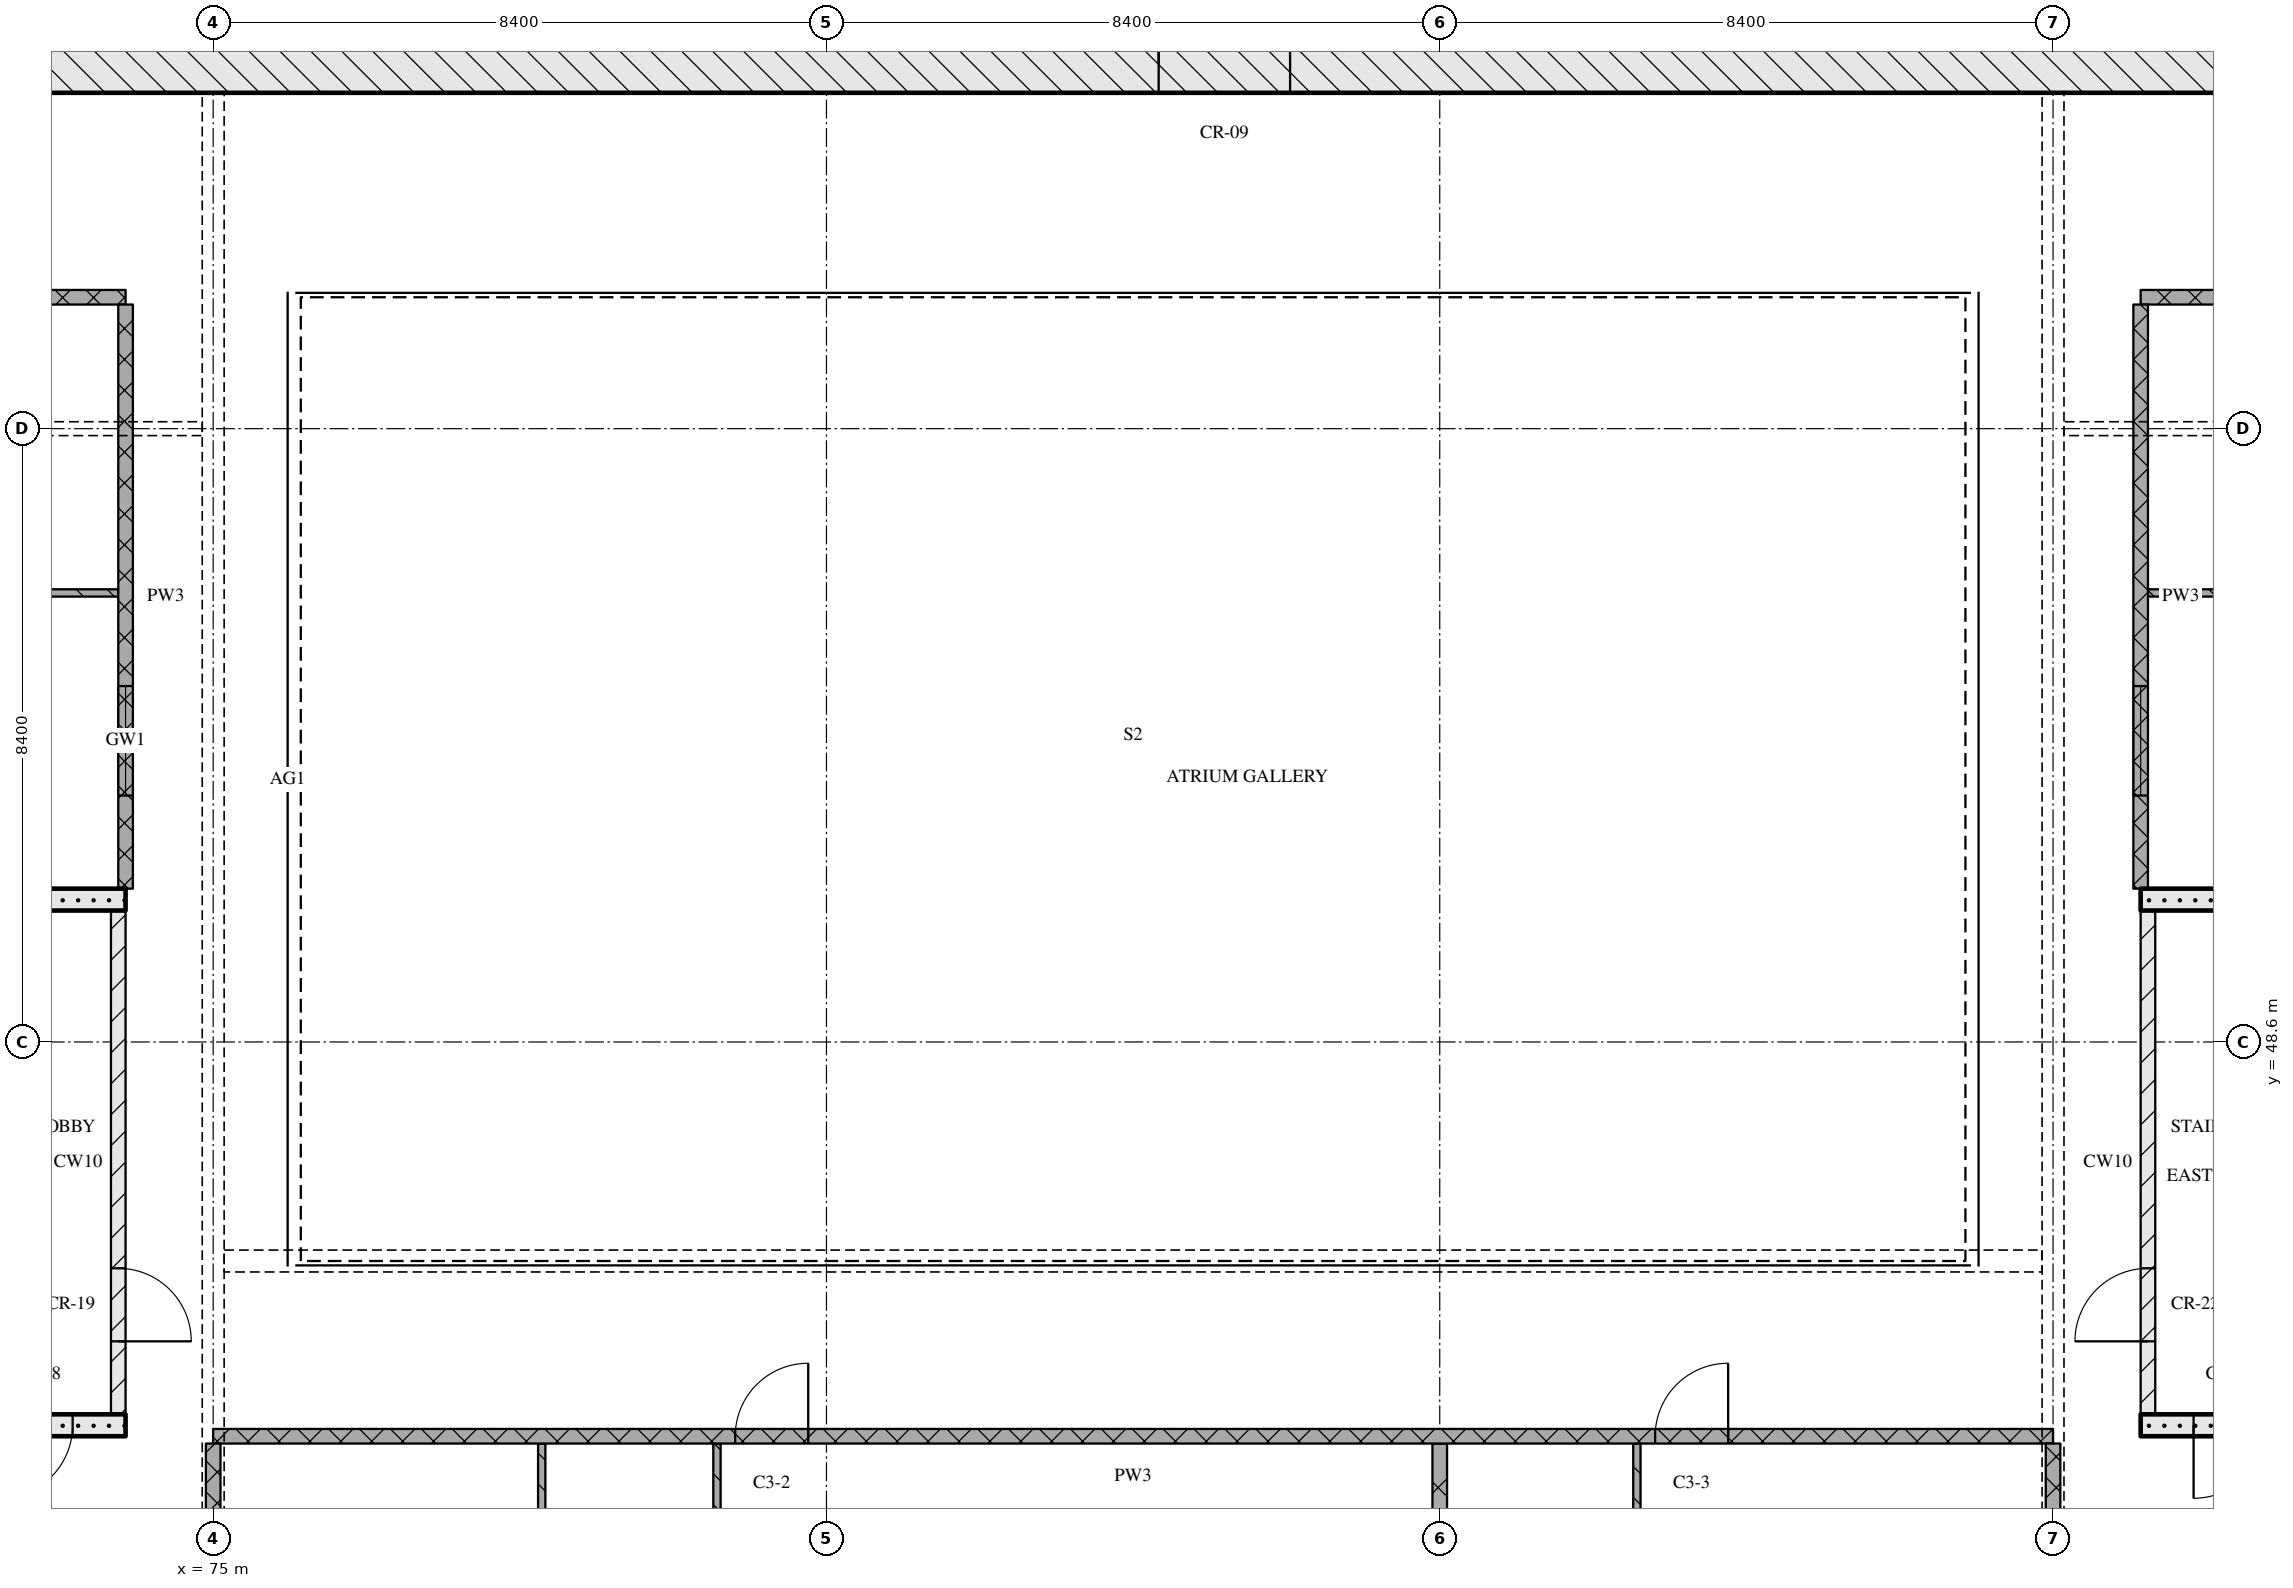
"""IFC4 building model, lengths in metres.
Left out: names, types, materials, properties, quantities, classifications, styles, units other than length and angle.
Written with IfcOpenShell. Run it as: python <this file> out.ifc"""

import sys

from ifc_helpers import new_model, si_unit, direction, frame, frame_2d, origin, place, context, subcontext, project, spatial, rectangle, extrude, element, fill, save


model = new_model("IFC4")
c1 = context("Model", 3, precision=1e-05, world=origin(), true_north=direction((0.0, 1.0)))
c2 = subcontext(c1, "Body", "Model", "MODEL_VIEW")
j1 = project(units=[si_unit("LENGTHUNIT", "METRE"), si_unit("PLANEANGLEUNIT", "RADIAN")], contexts=[c1])
p1 = place(None, origin())
s1 = spatial("IfcSite", under=j1, at=p1, CompositionType="ELEMENT")
p2 = place(p1, origin())
s2 = spatial("IfcBuilding", under=s1, at=p2, CompositionType="ELEMENT")
p3 = place(p2, frame((0.0, 0.0, 172.65)))
s3 = spatial("IfcBuildingStorey", under=s2, at=p3, CompositionType="ELEMENT", Elevation=172.65)
p4 = place(p3, frame((67.0, 62.0, 0.0), z_axis=(0.0, 0.0, 1.0), x_axis=(1.0, 0.0, 0.0)))
e1 = element("IfcWall", 1, at=p4, inside=s3, PredefinedType="SOLIDWALL", context=c2, shape_type="SweptSolid", body=[
    extrude(rectangle(XDim=41.2, YDim=0.8, at=frame_2d((20.6, 0.0))), origin(), (0.0, 0.0, 1.0), 3.32),
])
p5 = place(p4, frame((20.95, 0.0, 0.0)))
e2 = element("IfcOpeningElement", 2, at=p5, cuts=e1, PredefinedType="OPENING", context=c2, shape_type="SweptSolid", body=[
    extrude(rectangle(XDim=1.8, YDim=2.1, at=frame_2d((0.9, 1.05))), frame((0.0, 0.41, 0.0), z_axis=(0.0, -1.0, 0.0), x_axis=(1.0, 0.0, 0.0)), (0.0, 0.0, 1.0), 0.82),
])
p6 = place(p3, frame((68.2, 43.35, 0.0), z_axis=(0.0, 0.0, 1.0), x_axis=(1.0, 0.0, 0.0)))
e3 = element("IfcWall", 3, at=p6, inside=s3, PredefinedType="SOLIDWALL", context=c2, shape_type="SweptSolid", body=[
    extrude(rectangle(XDim=5.6, YDim=0.3, at=frame_2d((2.8, 0.0))), origin(), (0.0, 0.0, 1.0), 3.32),
])
p7 = place(p6, frame((3.875, 0.0, 0.0)))
e4 = element("IfcOpeningElement", 4, at=p7, cuts=e3, PredefinedType="OPENING", context=c2, shape_type="SweptSolid", body=[
    extrude(rectangle(XDim=1.0, YDim=2.1, at=frame_2d((0.5, 1.05))), frame((0.0, 0.16, 0.0), z_axis=(0.0, -1.0, 0.0), x_axis=(1.0, 0.0, 0.0)), (0.0, 0.0, 1.0), 0.32),
])
p8 = place(p3, frame((73.7, 43.5, 0.0), z_axis=(0.0, 0.0, 1.0), x_axis=(0.0, 1.0, 0.0)))
e5 = element("IfcWall", 5, at=p8, inside=s3, PredefinedType="PARTITIONING", context=c2, shape_type="SweptSolid", body=[
    extrude(rectangle(XDim=6.9, YDim=0.2, at=frame_2d((3.45, 0.0))), origin(), (0.0, 0.0, 1.0), 3.32),
])
p9 = place(p8, frame((1.0, 0.0, 0.0)))
e6 = element("IfcOpeningElement", 6, at=p9, cuts=e5, PredefinedType="OPENING", context=c2, shape_type="SweptSolid", body=[
    extrude(rectangle(XDim=1.0, YDim=2.1, at=frame_2d((0.5, 1.05))), frame((0.0, 0.11, 0.0), z_axis=(0.0, -1.0, 0.0), x_axis=(1.0, 0.0, 0.0)), (0.0, 0.0, 1.0), 0.22),
])
p10 = place(p3, frame((68.2, 50.55, 0.0), z_axis=(0.0, 0.0, 1.0), x_axis=(1.0, 0.0, 0.0)))
e7 = element("IfcWall", 7, at=p10, inside=s3, PredefinedType="SOLIDWALL", context=c2, shape_type="SweptSolid", body=[
    extrude(rectangle(XDim=5.6, YDim=0.3, at=frame_2d((2.8, 0.0))), origin(), (0.0, 0.0, 1.0), 3.32),
])
p11 = place(p3, frame((101.4, 43.35, 0.0), z_axis=(0.0, 0.0, 1.0), x_axis=(1.0, 0.0, 0.0)))
e8 = element("IfcWall", 8, at=p11, inside=s3, PredefinedType="SOLIDWALL", context=c2, shape_type="SweptSolid", body=[
    extrude(rectangle(XDim=5.6, YDim=0.3, at=frame_2d((2.8, 0.0))), origin(), (0.0, 0.0, 1.0), 3.32),
])
p12 = place(p11, frame((0.725, 0.0, 0.0)))
e9 = element("IfcOpeningElement", 9, at=p12, cuts=e8, PredefinedType="OPENING", context=c2, shape_type="SweptSolid", body=[
    extrude(rectangle(XDim=1.0, YDim=2.1, at=frame_2d((0.5, 1.05))), frame((0.0, 0.16, 0.0), z_axis=(0.0, -1.0, 0.0), x_axis=(1.0, 0.0, 0.0)), (0.0, 0.0, 1.0), 0.32),
])
p13 = place(p3, frame((101.5, 43.5, 0.0), z_axis=(0.0, 0.0, 1.0), x_axis=(0.0, 1.0, 0.0)))
e10 = element("IfcWall", 10, at=p13, inside=s3, PredefinedType="PARTITIONING", context=c2, shape_type="SweptSolid", body=[
    extrude(rectangle(XDim=6.9, YDim=0.2, at=frame_2d((3.45, 0.0))), origin(), (0.0, 0.0, 1.0), 3.32),
])
p14 = place(p13, frame((1.0, 0.0, 0.0)))
e11 = element("IfcOpeningElement", 11, at=p14, cuts=e10, PredefinedType="OPENING", context=c2, shape_type="SweptSolid", body=[
    extrude(rectangle(XDim=1.0, YDim=2.1, at=frame_2d((0.5, 1.05))), frame((0.0, 0.11, 0.0), z_axis=(0.0, -1.0, 0.0), x_axis=(1.0, 0.0, 0.0)), (0.0, 0.0, 1.0), 0.22),
])
p15 = place(p3, frame((101.4, 50.55, 0.0), z_axis=(0.0, 0.0, 1.0), x_axis=(1.0, 0.0, 0.0)))
e12 = element("IfcWall", 12, at=p15, inside=s3, PredefinedType="SOLIDWALL", context=c2, shape_type="SweptSolid", body=[
    extrude(rectangle(XDim=5.6, YDim=0.3, at=frame_2d((2.8, 0.0))), origin(), (0.0, 0.0, 1.0), 3.32),
])
p16 = place(p3, frame((100.2, 43.2, 0.0), z_axis=(0.0, 0.0, 1.0), x_axis=(-1.0, 0.0, 0.0)))
e13 = element("IfcWall", 13, at=p16, inside=s3, PredefinedType="PARTITIONING", context=c2, shape_type="SweptSolid", body=[
    extrude(rectangle(XDim=25.2, YDim=0.2, at=frame_2d((12.6, 0.0))), origin(), (0.0, 0.0, 1.0), 3.32),
])
p17 = place(p16, frame((4.45, 0.0, 0.0)))
e14 = element("IfcOpeningElement", 14, at=p17, cuts=e13, PredefinedType="OPENING", context=c2, shape_type="SweptSolid", body=[
    extrude(rectangle(XDim=1.0, YDim=2.1, at=frame_2d((0.5, 1.05))), frame((0.0, 0.11, 0.0), z_axis=(0.0, -1.0, 0.0), x_axis=(1.0, 0.0, 0.0)), (0.0, 0.0, 1.0), 0.22),
])
p18 = place(p16, frame((17.05, 0.0, 0.0)))
e15 = element("IfcOpeningElement", 15, at=p18, cuts=e13, PredefinedType="OPENING", context=c2, shape_type="SweptSolid", body=[
    extrude(rectangle(XDim=1.0, YDim=2.1, at=frame_2d((0.5, 1.05))), frame((0.0, 0.11, 0.0), z_axis=(0.0, -1.0, 0.0), x_axis=(1.0, 0.0, 0.0)), (0.0, 0.0, 1.0), 0.22),
])
p19 = place(p3, frame((73.7, 54.75, 0.0), z_axis=(0.0, 0.0, 1.0), x_axis=(-1.0, 0.0, 0.0)))
e16 = element("IfcWall", 16, at=p19, inside=s3, PredefinedType="PARTITIONING", context=c2, shape_type="SweptSolid", body=[
    extrude(rectangle(XDim=5.3, YDim=0.1, at=frame_2d((2.65, 0.0))), origin(), (0.0, 0.0, 1.0), 3.32),
])
p20 = place(p19, frame((2.15, 0.0, 0.0)))
e17 = element("IfcOpeningElement", 17, at=p20, cuts=e16, PredefinedType="OPENING", context=c2, shape_type="SweptSolid", body=[
    extrude(rectangle(XDim=0.9, YDim=2.1, at=frame_2d((0.45, 1.05))), frame((0.0, 0.06, 0.0), z_axis=(0.0, -1.0, 0.0), x_axis=(1.0, 0.0, 0.0)), (0.0, 0.0, 1.0), 0.12),
])
p21 = place(p3, frame((101.5, 54.75, 0.0), z_axis=(0.0, 0.0, 1.0), x_axis=(1.0, 0.0, 0.0)))
e18 = element("IfcWall", 18, at=p21, inside=s3, PredefinedType="PARTITIONING", context=c2, shape_type="SweptSolid", body=[
    extrude(rectangle(XDim=6.2, YDim=0.1, at=frame_2d((3.1, 0.0))), origin(), (0.0, 0.0, 1.0), 3.32),
])
p22 = place(p3, frame((63.0, 58.8, 0.0), z_axis=(0.0, 0.0, 1.0), x_axis=(1.0, 0.0, 0.0)))
e19 = element("IfcWall", 19, at=p22, inside=s3, PredefinedType="PARTITIONING", context=c2, shape_type="SweptSolid", body=[
    extrude(rectangle(XDim=10.8, YDim=0.2, at=frame_2d((5.4, 0.0))), origin(), (0.0, 0.0, 1.0), 3.32),
])
p23 = place(p3, frame((112.2, 58.8, 0.0), z_axis=(0.0, 0.0, 1.0), x_axis=(-1.0, 0.0, 0.0)))
e20 = element("IfcWall", 20, at=p23, inside=s3, PredefinedType="PARTITIONING", context=c2, shape_type="SweptSolid", body=[
    extrude(rectangle(XDim=10.8, YDim=0.2, at=frame_2d((5.4, 0.0))), origin(), (0.0, 0.0, 1.0), 3.32),
])
p24 = place(p23, frame((2.85, 0.0, 0.0)))
e21 = element("IfcOpeningElement", 21, at=p24, cuts=e20, PredefinedType="OPENING", context=c2, shape_type="SweptSolid", body=[
    extrude(rectangle(XDim=1.0, YDim=2.1, at=frame_2d((0.5, 1.05))), frame((0.0, 0.11, 0.0), z_axis=(0.0, -1.0, 0.0), x_axis=(1.0, 0.0, 0.0)), (0.0, 0.0, 1.0), 0.22),
])
p25 = place(p3, frame((73.8, 58.7, 0.0), z_axis=(0.0, 0.0, 1.0), x_axis=(0.0, -1.0, 0.0)))
e22 = element("IfcWall", 22, at=p25, inside=s3, PredefinedType="PARTITIONING", context=c2, shape_type="SweptSolid", body=[
    extrude(rectangle(XDim=8.0, YDim=0.2, at=frame_2d((4.0, 0.0))), origin(), (0.0, 0.0, 1.0), 3.32),
])
p26 = place(p25, frame((5.225, 0.0, 0.9)))
e23 = element("IfcOpeningElement", 23, at=p26, cuts=e22, PredefinedType="OPENING", context=c2, shape_type="SweptSolid", body=[
    extrude(rectangle(XDim=1.5, YDim=1.5, at=frame_2d((0.75, 0.75))), frame((0.0, 0.11, 0.0), z_axis=(0.0, -1.0, 0.0), x_axis=(1.0, 0.0, 0.0)), (0.0, 0.0, 1.0), 0.22),
])
p27 = place(p3, frame((75.0, 43.1, 0.0), z_axis=(0.0, 0.0, 1.0), x_axis=(0.0, -1.0, 0.0)))
e24 = element("IfcWall", 24, at=p27, inside=s3, PredefinedType="PARTITIONING", context=c2, shape_type="SweptSolid", body=[
    extrude(rectangle(XDim=2.2, YDim=0.2, at=frame_2d((1.1, 0.0))), origin(), (0.0, 0.0, 1.0), 2.43),
])
for number, where, z_axis, x_axis in (
    (25, (79.5, 43.1, 0.0), (0.0, 0.0, 1.0), (0.0, -1.0, 0.0)),
    (26, (81.9, 43.1, 0.0), (0.0, 0.0, 1.0), (0.0, -1.0, 0.0)),
):
    element("IfcWall", number, at=place(p3, frame(where, z_axis=z_axis, x_axis=x_axis)), inside=s3, PredefinedType="PARTITIONING", context=c2, shape_type="SweptSolid", body=[
        extrude(rectangle(XDim=4.35, YDim=0.1, at=frame_2d((2.175, 0.0))), origin(), (0.0, 0.0, 1.0), 3.32),
    ])
p28 = place(p3, frame((91.8, 43.1, 0.0), z_axis=(0.0, 0.0, 1.0), x_axis=(0.0, -1.0, 0.0)))
e27 = element("IfcWall", 27, at=p28, inside=s3, PredefinedType="PARTITIONING", context=c2, shape_type="SweptSolid", body=[
    extrude(rectangle(XDim=2.53, YDim=0.2, at=frame_2d((1.265, 0.0))), origin(), (0.0, 0.0, 1.0), 3.32),
])
p29 = place(p3, frame((94.5, 43.1, 0.0), z_axis=(0.0, 0.0, 1.0), x_axis=(0.0, -1.0, 0.0)))
e28 = element("IfcWall", 28, at=p29, inside=s3, PredefinedType="PARTITIONING", context=c2, shape_type="SweptSolid", body=[
    extrude(rectangle(XDim=3.75, YDim=0.1, at=frame_2d((1.875, 0.0))), origin(), (0.0, 0.0, 1.0), 3.32),
])
p30 = place(p3, frame((100.2, 43.1, 0.0), z_axis=(0.0, 0.0, 1.0), x_axis=(0.0, -1.0, 0.0)))
e29 = element("IfcWall", 29, at=p30, inside=s3, PredefinedType="PARTITIONING", context=c2, shape_type="SweptSolid", body=[
    extrude(rectangle(XDim=2.2, YDim=0.2, at=frame_2d((1.1, 0.0))), origin(), (0.0, 0.0, 1.0), 2.43),
])
p31 = place(p3, frame((101.4, 58.7, 0.0), z_axis=(0.0, 0.0, 1.0), x_axis=(0.0, -1.0, 0.0)))
e30 = element("IfcWall", 30, at=p31, inside=s3, PredefinedType="PARTITIONING", context=c2, shape_type="SweptSolid", body=[
    extrude(rectangle(XDim=8.0, YDim=0.2, at=frame_2d((4.0, 0.0))), origin(), (0.0, 0.0, 1.0), 3.32),
])
p32 = place(p31, frame((5.225, 0.0, 0.9)))
e31 = element("IfcOpeningElement", 31, at=p32, cuts=e30, PredefinedType="OPENING", context=c2, shape_type="SweptSolid", body=[
    extrude(rectangle(XDim=1.5, YDim=1.5, at=frame_2d((0.75, 0.75))), frame((0.0, 0.11, 0.0), z_axis=(0.0, -1.0, 0.0), x_axis=(1.0, 0.0, 0.0)), (0.0, 0.0, 1.0), 0.22),
])
p33 = place(p5, origin())
e32 = element("IfcDoor", 32, at=p33, inside=s3, OperationType="DOUBLE_DOOR_SINGLE_SWING", PredefinedType="DOOR", context=c2, shape_type="SweptSolid", body=[
    extrude(rectangle(XDim=1.8, YDim=2.1, at=frame_2d((0.9, 1.05))), frame((0.0, 0.025, 0.0), z_axis=(0.0, -1.0, 0.0), x_axis=(1.0, 0.0, 0.0)), (0.0, 0.0, 1.0), 0.05),
])
fill(e2, e32)
p34 = place(p7, origin())
e33 = element("IfcDoor", 33, at=p34, inside=s3, OperationType="SINGLE_SWING_RIGHT", PredefinedType="DOOR", context=c2, shape_type="SweptSolid", body=[
    extrude(rectangle(XDim=1.0, YDim=2.1, at=frame_2d((0.5, 1.05))), frame((0.0, 0.025, 0.0), z_axis=(0.0, -1.0, 0.0), x_axis=(1.0, 0.0, 0.0)), (0.0, 0.0, 1.0), 0.05),
])
fill(e4, e33)
p35 = place(p9, origin())
e34 = element("IfcDoor", 34, at=p35, inside=s3, OperationType="SINGLE_SWING_RIGHT", PredefinedType="DOOR", context=c2, shape_type="SweptSolid", body=[
    extrude(rectangle(XDim=1.0, YDim=2.1, at=frame_2d((0.5, 1.05))), frame((0.0, 0.025, 0.0), z_axis=(0.0, -1.0, 0.0), x_axis=(1.0, 0.0, 0.0)), (0.0, 0.0, 1.0), 0.05),
])
fill(e6, e34)
p36 = place(p12, origin())
e35 = element("IfcDoor", 35, at=p36, inside=s3, OperationType="SINGLE_SWING_RIGHT", PredefinedType="DOOR", context=c2, shape_type="SweptSolid", body=[
    extrude(rectangle(XDim=1.0, YDim=2.1, at=frame_2d((0.5, 1.05))), frame((0.0, 0.025, 0.0), z_axis=(0.0, -1.0, 0.0), x_axis=(1.0, 0.0, 0.0)), (0.0, 0.0, 1.0), 0.05),
])
fill(e9, e35)
p37 = place(p14, origin())
e36 = element("IfcDoor", 36, at=p37, inside=s3, OperationType="SINGLE_SWING_LEFT", PredefinedType="DOOR", context=c2, shape_type="SweptSolid", body=[
    extrude(rectangle(XDim=1.0, YDim=2.1, at=frame_2d((0.5, 1.05))), frame((0.0, 0.025, 0.0), z_axis=(0.0, -1.0, 0.0), x_axis=(1.0, 0.0, 0.0)), (0.0, 0.0, 1.0), 0.05),
])
fill(e11, e36)
p38 = place(p17, origin())
e37 = element("IfcDoor", 37, at=p38, inside=s3, OperationType="SINGLE_SWING_RIGHT", PredefinedType="DOOR", context=c2, shape_type="SweptSolid", body=[
    extrude(rectangle(XDim=1.0, YDim=2.1, at=frame_2d((0.5, 1.05))), frame((0.0, 0.025, 0.0), z_axis=(0.0, -1.0, 0.0), x_axis=(1.0, 0.0, 0.0)), (0.0, 0.0, 1.0), 0.05),
])
fill(e14, e37)
p39 = place(p18, origin())
e38 = element("IfcDoor", 38, at=p39, inside=s3, OperationType="SINGLE_SWING_RIGHT", PredefinedType="DOOR", context=c2, shape_type="SweptSolid", body=[
    extrude(rectangle(XDim=1.0, YDim=2.1, at=frame_2d((0.5, 1.05))), frame((0.0, 0.025, 0.0), z_axis=(0.0, -1.0, 0.0), x_axis=(1.0, 0.0, 0.0)), (0.0, 0.0, 1.0), 0.05),
])
fill(e15, e38)
p40 = place(p26, origin())
e39 = element("IfcWindow", 39, at=p40, inside=s3, PartitioningType="SINGLE_PANEL", PredefinedType="WINDOW", context=c2, shape_type="SweptSolid", body=[
    extrude(rectangle(XDim=1.5, YDim=1.5, at=frame_2d((0.75, 0.75))), frame((0.0, 0.03, 0.0), z_axis=(0.0, -1.0, 0.0), x_axis=(1.0, 0.0, 0.0)), (0.0, 0.0, 1.0), 0.06),
])
fill(e23, e39)
p41 = place(p32, origin())
e40 = element("IfcWindow", 40, at=p41, inside=s3, PartitioningType="SINGLE_PANEL", PredefinedType="WINDOW", context=c2, shape_type="SweptSolid", body=[
    extrude(rectangle(XDim=1.5, YDim=1.5, at=frame_2d((0.75, 0.75))), frame((0.0, 0.03, 0.0), z_axis=(0.0, -1.0, 0.0), x_axis=(1.0, 0.0, 0.0)), (0.0, 0.0, 1.0), 0.06),
])
fill(e31, e40)
save(model, sys.argv[1])
